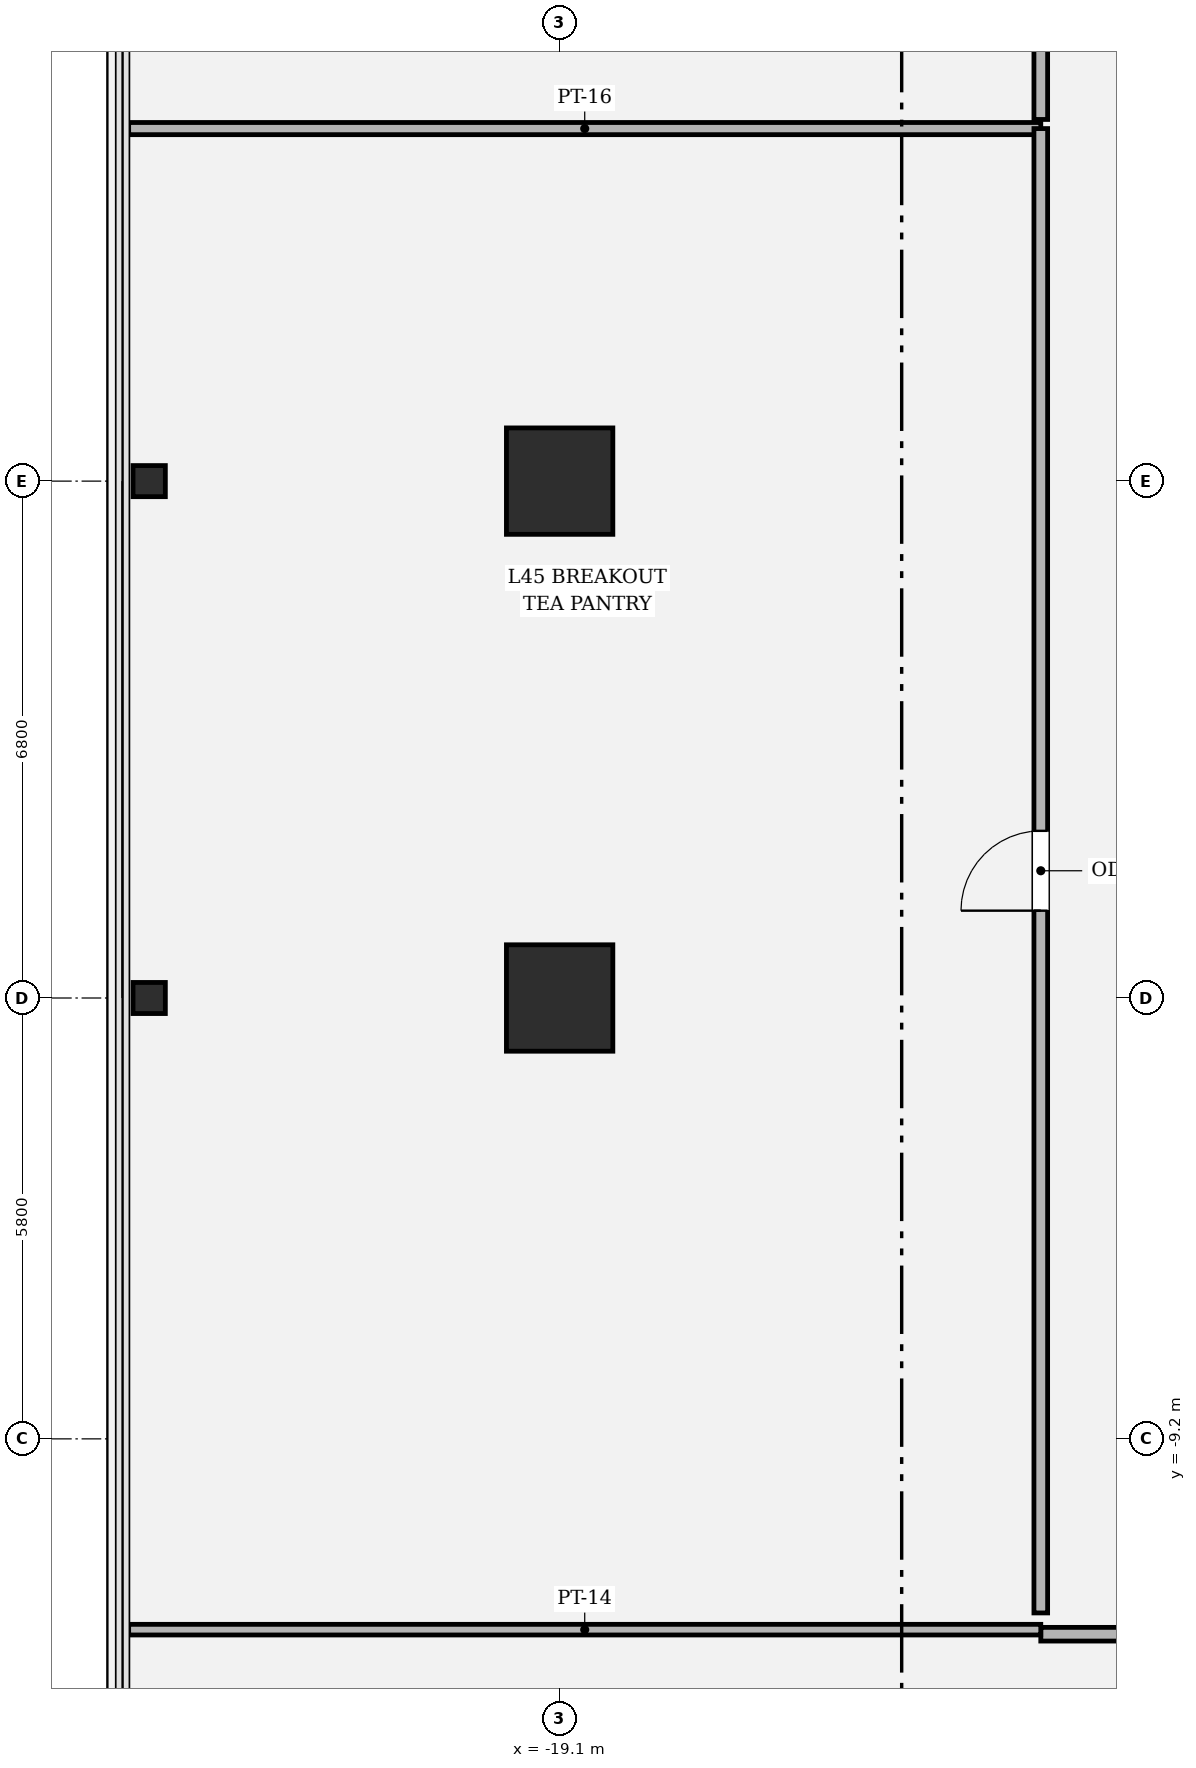
"""IFC4 building model, lengths in metres.
Left out: names, types, materials, properties, quantities, classifications, styles, units other than length and angle.
Written with IfcOpenShell. Run it as: python <this file> out.ifc"""

import sys

from ifc_helpers import new_model, si_unit, direction, frame, frame_2d, origin, origin_2d, place, context, subcontext, project, spatial, rectangle, hollow_rectangle, i_section, extrude, element, fill, save


model = new_model("IFC4")
c1 = context("Model", 3, precision=1e-05, world=origin(), true_north=direction((0.0, 1.0)))
c2 = subcontext(c1, "Body", "Model", "MODEL_VIEW")
j1 = project(units=[si_unit("LENGTHUNIT", "METRE"), si_unit("PLANEANGLEUNIT", "RADIAN")], contexts=[c1])
p1 = place(None, origin())
s1 = spatial("IfcSite", under=j1, at=p1, CompositionType="ELEMENT")
p2 = place(p1, origin())
s2 = spatial("IfcBuilding", under=s1, at=p2, CompositionType="ELEMENT")
p3 = place(p2, frame((0.0, 0.0, 192.45)))
s3 = spatial("IfcBuildingStorey", under=s2, at=p3, CompositionType="ELEMENT", Elevation=192.45)
for number, where, z_axis, x_axis in (
    (1, (-19.1, 3.4, 0.0), (0.0, 0.0, 1.0), (1.0, 0.0, 0.0)),
    (2, (-19.1, -3.4, 0.0), (0.0, 0.0, 1.0), (1.0, 0.0, 0.0)),
):
    element("IfcColumn", number, at=place(p3, frame(where, z_axis=z_axis, x_axis=x_axis)), inside=s3, PredefinedType="COLUMN", context=c2, shape_type="SweptSolid", body=[
        extrude(hollow_rectangle(XDim=1.4, YDim=1.4, WallThickness=0.042, at=origin_2d()), origin(), (0.0, 0.0, 1.0), 4.05),
    ])
for number, where, z_axis, x_axis in (
    (3, (-24.5, -3.4, 0.0), (0.0, 0.0, 1.0), (0.0, 1.0, 0.0)),
    (4, (-24.5, 3.4, 0.0), (0.0, 0.0, 1.0), (0.0, 1.0, 0.0)),
):
    element("IfcColumn", number, at=place(p3, frame(where, z_axis=z_axis, x_axis=x_axis)), inside=s3, PredefinedType="COLUMN", context=c2, shape_type="SweptSolid", body=[
        extrude(i_section(OverallWidth=0.409, OverallDepth=0.425, WebThickness=0.032, FlangeThickness=0.052, FilletRadius=0.018, at=origin_2d()), origin(), (0.0, 0.0, 1.0), 4.048),
    ])
p4 = place(p3, frame((-12.77, -11.77, 0.0), z_axis=(0.0, 0.0, 1.0), x_axis=(1.0, 0.0, 0.0)))
e5 = element("IfcWall", 5, at=p4, inside=s3, PredefinedType="PARTITIONING", context=c2, shape_type="SweptSolid", body=[
    extrude(rectangle(XDim=11.57, YDim=0.18, at=frame_2d((5.785, 0.0))), origin(), (0.0, 0.0, 1.0), 3.174),
])
p5 = place(p4, frame((5.085, 0.0, 0.0)))
e6 = element("IfcOpeningElement", 6, at=p5, cuts=e5, PredefinedType="OPENING", context=c2, shape_type="SweptSolid", body=[
    extrude(rectangle(XDim=1.4, YDim=2.25, at=frame_2d((0.7, 1.125))), frame((0.0, 0.1, 0.0), z_axis=(0.0, -1.0, 0.0), x_axis=(1.0, 0.0, 0.0)), (0.0, 0.0, 1.0), 0.2),
])
p6 = place(p3, frame((-24.77, -11.71, 0.0), z_axis=(0.0, 0.0, 1.0), x_axis=(1.0, 0.0, 0.0)))
e7 = element("IfcWall", 7, at=p6, inside=s3, PredefinedType="PARTITIONING", context=c2, shape_type="SweptSolid", body=[
    extrude(rectangle(XDim=12.0, YDim=0.14, at=frame_2d((6.0, 0.0))), origin(), (0.0, 0.0, 1.0), 2.544),
])
p7 = place(p3, frame((-24.77, 8.038, 0.0), z_axis=(0.0, 0.0, 1.0), x_axis=(1.0, 0.0, 0.0)))
e8 = element("IfcWall", 8, at=p7, inside=s3, PredefinedType="PARTITIONING", context=c2, shape_type="SweptSolid", body=[
    extrude(rectangle(XDim=12.0, YDim=0.16, at=frame_2d((6.0, 0.0))), origin(), (0.0, 0.0, 1.0), 2.544),
])
p8 = place(p3, frame((-12.77, 8.038, 0.0), z_axis=(0.0, 0.0, 1.0), x_axis=(0.0, -1.0, 0.0)))
e9 = element("IfcWall", 9, at=p8, inside=s3, PredefinedType="PARTITIONING", context=c2, shape_type="SweptSolid", body=[
    extrude(rectangle(XDim=19.528, YDim=0.18, at=frame_2d((9.764, 0.0))), origin(), (0.0, 0.0, 1.0), 3.174),
])
p9 = place(p8, frame((9.239, 0.0, 0.0)))
e10 = element("IfcOpeningElement", 10, at=p9, cuts=e9, PredefinedType="OPENING", context=c2, shape_type="SweptSolid", body=[
    extrude(rectangle(XDim=1.05, YDim=2.2, at=frame_2d((0.525, 1.1))), frame((0.0, 0.1, 0.0), z_axis=(0.0, -1.0, 0.0), x_axis=(1.0, 0.0, 0.0)), (0.0, 0.0, 1.0), 0.2),
])
p10 = place(p3, frame((-12.77, 18.37, 0.0), z_axis=(0.0, 0.0, 1.0), x_axis=(0.0, -1.0, 0.0)))
e11 = element("IfcWall", 11, at=p10, inside=s3, PredefinedType="PARTITIONING", context=c2, shape_type="SweptSolid", body=[
    extrude(rectangle(XDim=10.212, YDim=0.18, at=frame_2d((5.106, 0.0))), origin(), (0.0, 0.0, 1.0), 3.174),
])
p11 = place(p10, frame((4.406, 0.0, 0.0)))
e12 = element("IfcOpeningElement", 12, at=p11, cuts=e11, PredefinedType="OPENING", context=c2, shape_type="SweptSolid", body=[
    extrude(rectangle(XDim=1.4, YDim=2.25, at=frame_2d((0.7, 1.125))), frame((0.0, 0.1, 0.0), z_axis=(0.0, -1.0, 0.0), x_axis=(1.0, 0.0, 0.0)), (0.0, 0.0, 1.0), 0.2),
])
p12 = place(p9, origin())
e13 = element("IfcDoor", 13, at=p12, inside=s3, OperationType="SINGLE_SWING_RIGHT", PredefinedType="DOOR", context=c2, shape_type="SweptSolid", body=[
    extrude(rectangle(XDim=1.05, YDim=2.2, at=frame_2d((0.525, 1.1))), frame((0.0, 0.025, 0.0), z_axis=(0.0, -1.0, 0.0), x_axis=(1.0, 0.0, 0.0)), (0.0, 0.0, 1.0), 0.05),
])
fill(e10, e13)
save(model, sys.argv[1])
